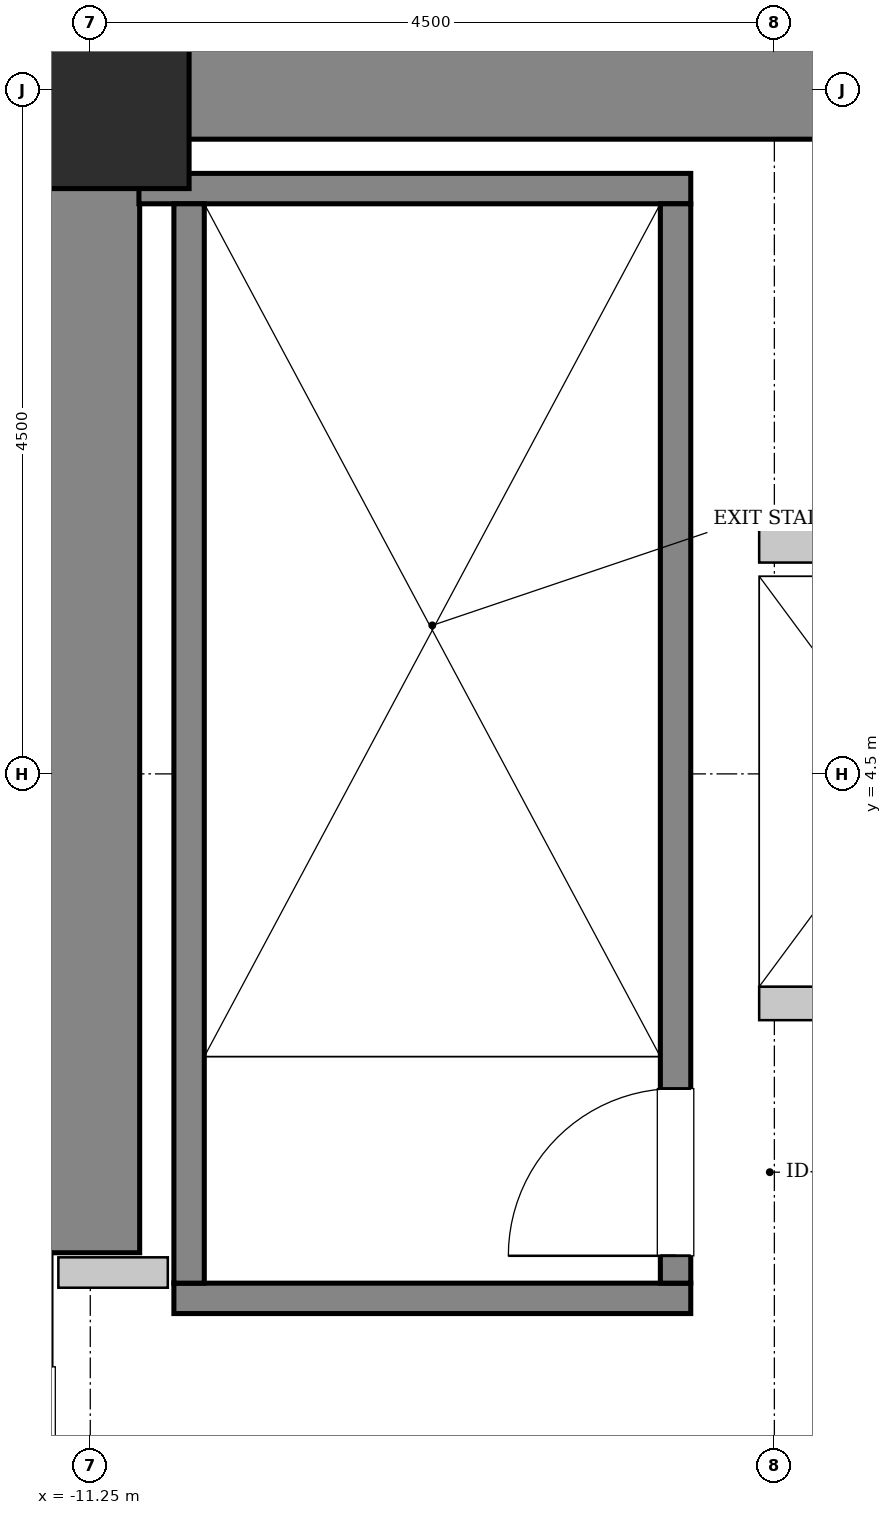
"""IFC4 building model, lengths in metres.
Left out: names, types, materials, properties, quantities, classifications, styles, units other than length and angle.
Written with IfcOpenShell. Run it as: python <this file> out.ifc"""

import sys

from ifc_helpers import new_model, si_unit, direction, frame, frame_2d, origin, origin_2d, place, context, subcontext, project, spatial, rectangle, hollow_rectangle, extrude, source, transform, mapped, element, fill, save


model = new_model("IFC4")
c1 = context("Model", 3, precision=1e-05, world=origin(), true_north=direction((0.0, 1.0)))
c2 = subcontext(c1, "Body", "Model", "MODEL_VIEW")
j1 = project(units=[si_unit("LENGTHUNIT", "METRE"), si_unit("PLANEANGLEUNIT", "RADIAN")], contexts=[c1])
p1 = place(None, origin())
s1 = spatial("IfcSite", under=j1, at=p1, CompositionType="ELEMENT")
p2 = place(p1, origin())
s2 = spatial("IfcBuilding", under=s1, at=p2, CompositionType="ELEMENT")
p3 = place(p2, frame((0.0, 0.0, 16.8)))
s3 = spatial("IfcBuildingStorey", under=s2, at=p3, CompositionType="ELEMENT", Elevation=16.8)
m1 = source(origin(), c2, "Body", "SweptSolid", [
    extrude(rectangle(XDim=10.025, YDim=0.65, at=frame_2d((5.012, 0.0))), origin(), (0.0, 0.0, 1.0), 5.4),
])
p4 = place(p3, frame((-11.575, 9.0, 0.0), z_axis=(0.0, 0.0, 1.0), x_axis=(1.0, 0.0, 0.0)))
e1 = element("IfcWall", 1, at=p4, inside=s3, PredefinedType="SHEAR", context=c2, shape_type="MappedRepresentation", body=[
    mapped(m1, transform((0.0, 0.0, 0.0), x_axis=(1.0, 0.0, 0.0), y_axis=(0.0, 1.0, 0.0), z_axis=(0.0, 0.0, 1.0), scale=1.0)),
])
m2 = source(origin(), c2, "Body", "SweptSolid", [
    extrude(rectangle(XDim=7.325, YDim=0.65, at=frame_2d((3.663, 0.0))), origin(), (0.0, 0.0, 1.0), 5.4),
])
p5 = place(p3, frame((-11.25, 1.35, 0.0), z_axis=(0.0, 0.0, 1.0), x_axis=(0.0, 1.0, 0.0)))
e2 = element("IfcWall", 2, at=p5, inside=s3, PredefinedType="SHEAR", context=c2, shape_type="MappedRepresentation", body=[
    mapped(m2, transform((0.0, 0.0, 0.0), x_axis=(1.0, 0.0, 0.0), y_axis=(0.0, 1.0, 0.0), z_axis=(0.0, 0.0, 1.0), scale=1.0)),
])
m3 = source(origin(), c2, "Body", "SweptSolid", [
    extrude(hollow_rectangle(XDim=1.3, YDim=1.3, WallThickness=0.065, InnerFilletRadius=0.065, OuterFilletRadius=0.13, at=origin_2d()), origin(), (0.0, 0.0, 1.0), 5.4),
])
p6 = place(p3, frame((-11.25, 9.0, 0.0), z_axis=(0.0, 0.0, 1.0), x_axis=(1.0, 0.0, 0.0)))
e3 = element("IfcColumn", 3, at=p6, inside=s3, PredefinedType="COLUMN", context=c2, shape_type="MappedRepresentation", body=[
    mapped(m3, transform((0.0, 0.0, 0.0), x_axis=(1.0, 0.0, 0.0), y_axis=(0.0, 1.0, 0.0), z_axis=(0.0, 0.0, 1.0), scale=1.0)),
])
m4 = source(origin(), c2, "Body", "SweptSolid", [
    extrude(rectangle(XDim=3.4, YDim=0.2, at=frame_2d((1.7, 0.0))), origin(), (0.0, 0.0, 1.0), 5.4),
])
p7 = place(p3, frame((-7.3, 1.05, 0.0), z_axis=(0.0, 0.0, 1.0), x_axis=(-1.0, 0.0, 0.0)))
e4 = element("IfcWall", 4, at=p7, inside=s3, PredefinedType="SOLIDWALL", context=c2, shape_type="MappedRepresentation", body=[
    mapped(m4, transform((0.0, 0.0, 0.0), x_axis=(1.0, 0.0, 0.0), y_axis=(0.0, 1.0, 0.0), z_axis=(0.0, 0.0, 1.0), scale=1.0)),
])
m5 = source(origin(), c2, "Body", "SweptSolid", [
    extrude(rectangle(XDim=3.63, YDim=0.2, at=frame_2d((1.815, 0.0))), origin(), (0.0, 0.0, 1.0), 5.4),
])
p8 = place(p3, frame((-7.3, 8.35, 0.0), z_axis=(0.0, 0.0, 1.0), x_axis=(-1.0, 0.0, 0.0)))
e5 = element("IfcWall", 5, at=p8, inside=s3, PredefinedType="SOLIDWALL", context=c2, shape_type="MappedRepresentation", body=[
    mapped(m5, transform((0.0, 0.0, 0.0), x_axis=(1.0, 0.0, 0.0), y_axis=(0.0, 1.0, 0.0), z_axis=(0.0, 0.0, 1.0), scale=1.0)),
])
m6 = source(origin(), c2, "Body", "SweptSolid", [
    extrude(rectangle(XDim=7.1, YDim=0.2, at=frame_2d((3.55, 0.0))), origin(), (0.0, 0.0, 1.0), 5.4),
])
p9 = place(p3, frame((-7.4, 1.15, 0.0), z_axis=(0.0, 0.0, 1.0), x_axis=(0.0, 1.0, 0.0)))
e6 = element("IfcWall", 6, at=p9, inside=s3, PredefinedType="SOLIDWALL", context=c2, shape_type="MappedRepresentation", body=[
    mapped(m6, transform((0.0, 0.0, 0.0), x_axis=(1.0, 0.0, 0.0), y_axis=(0.0, 1.0, 0.0), z_axis=(0.0, 0.0, 1.0), scale=1.0)),
])
p10 = place(p9, frame((0.18, 0.0, 0.0)))
e7 = element("IfcOpeningElement", 7, at=p10, cuts=e6, PredefinedType="OPENING", context=c2, shape_type="SweptSolid", body=[
    extrude(rectangle(XDim=1.1, YDim=2.15, at=frame_2d((0.55, 1.075))), frame((0.0, 0.11, 0.0), z_axis=(0.0, -1.0, 0.0), x_axis=(1.0, 0.0, 0.0)), (0.0, 0.0, 1.0), 0.22),
])
p11 = place(p3, frame((-10.6, 1.15, 0.0), z_axis=(0.0, 0.0, 1.0), x_axis=(0.0, 1.0, 0.0)))
e8 = element("IfcWall", 8, at=p11, inside=s3, PredefinedType="SOLIDWALL", context=c2, shape_type="MappedRepresentation", body=[
    mapped(m6, transform((0.0, 0.0, 0.0), x_axis=(1.0, 0.0, 0.0), y_axis=(0.0, 1.0, 0.0), z_axis=(0.0, 0.0, 1.0), scale=1.0)),
])
m7 = source(origin(), c2, "Body", "SweptSolid", [
    extrude(rectangle(XDim=2.0, YDim=0.22, at=frame_2d((1.0, 0.0))), origin(), (0.0, 0.0, 1.0), 5.085),
])
p12 = place(p3, frame((-6.85, 2.99, 0.0), z_axis=(0.0, 0.0, 1.0), x_axis=(1.0, 0.0, 0.0)))
e9 = element("IfcWall", 9, at=p12, inside=s3, PredefinedType="SOLIDWALL", context=c2, shape_type="MappedRepresentation", body=[
    mapped(m7, transform((0.0, 0.0, 0.0), x_axis=(1.0, 0.0, 0.0), y_axis=(0.0, 1.0, 0.0), z_axis=(0.0, 0.0, 1.0), scale=1.0)),
])
p13 = place(p12, frame((0.4, 0.0, 0.0)))
e10 = element("IfcOpeningElement", 10, at=p13, cuts=e9, PredefinedType="OPENING", context=c2, shape_type="SweptSolid", body=[
    extrude(rectangle(XDim=1.2, YDim=2.2, at=frame_2d((0.6, 1.1))), frame((0.0, 0.12, 0.0), z_axis=(0.0, -1.0, 0.0), x_axis=(1.0, 0.0, 0.0)), (0.0, 0.0, 1.0), 0.24),
])
m8 = source(origin(), c2, "Body", "SweptSolid", [
    extrude(rectangle(XDim=2.095, YDim=0.22, at=frame_2d((1.048, 0.0))), origin(), (0.0, 0.0, 1.0), 5.085),
])
p14 = place(p3, frame((-6.85, 6.0, 0.0), z_axis=(0.0, 0.0, 1.0), x_axis=(1.0, 0.0, 0.0)))
e11 = element("IfcWall", 11, at=p14, inside=s3, PredefinedType="SOLIDWALL", context=c2, shape_type="MappedRepresentation", body=[
    mapped(m8, transform((0.0, 0.0, 0.0), x_axis=(1.0, 0.0, 0.0), y_axis=(0.0, 1.0, 0.0), z_axis=(0.0, 0.0, 1.0), scale=1.0)),
])
m9 = source(origin(), c2, "Body", "SweptSolid", [
    extrude(rectangle(XDim=0.72, YDim=0.2, at=frame_2d((0.36, 0.0))), origin(), (0.0, 0.0, 1.0), 5.085),
])
p15 = place(p3, frame((-11.46, 1.22, 0.0), z_axis=(0.0, 0.0, 1.0), x_axis=(1.0, 0.0, 0.0)))
e12 = element("IfcWall", 12, at=p15, inside=s3, PredefinedType="PARTITIONING", context=c2, shape_type="MappedRepresentation", body=[
    mapped(m9, transform((0.0, 0.0, 0.0), x_axis=(1.0, 0.0, 0.0), y_axis=(0.0, 1.0, 0.0), z_axis=(0.0, 0.0, 1.0), scale=1.0)),
])
m10 = source(origin(), c2, "Body", "SweptSolid", [
    extrude(rectangle(XDim=1.1, YDim=2.15, at=frame_2d((0.55, 1.075))), frame((0.0, 0.025, 0.0), z_axis=(0.0, -1.0, 0.0), x_axis=(1.0, 0.0, 0.0)), (0.0, 0.0, 1.0), 0.05),
])
p16 = place(p10, origin())
e13 = element("IfcDoor", 13, at=p16, inside=s3, OperationType="SINGLE_SWING_LEFT", PredefinedType="DOOR", context=c2, shape_type="MappedRepresentation", body=[
    mapped(m10, transform((0.0, 0.0, 0.0), x_axis=(1.0, 0.0, 0.0), y_axis=(0.0, 1.0, 0.0), z_axis=(0.0, 0.0, 1.0), scale=1.0)),
])
fill(e7, e13)
save(model, sys.argv[1])
